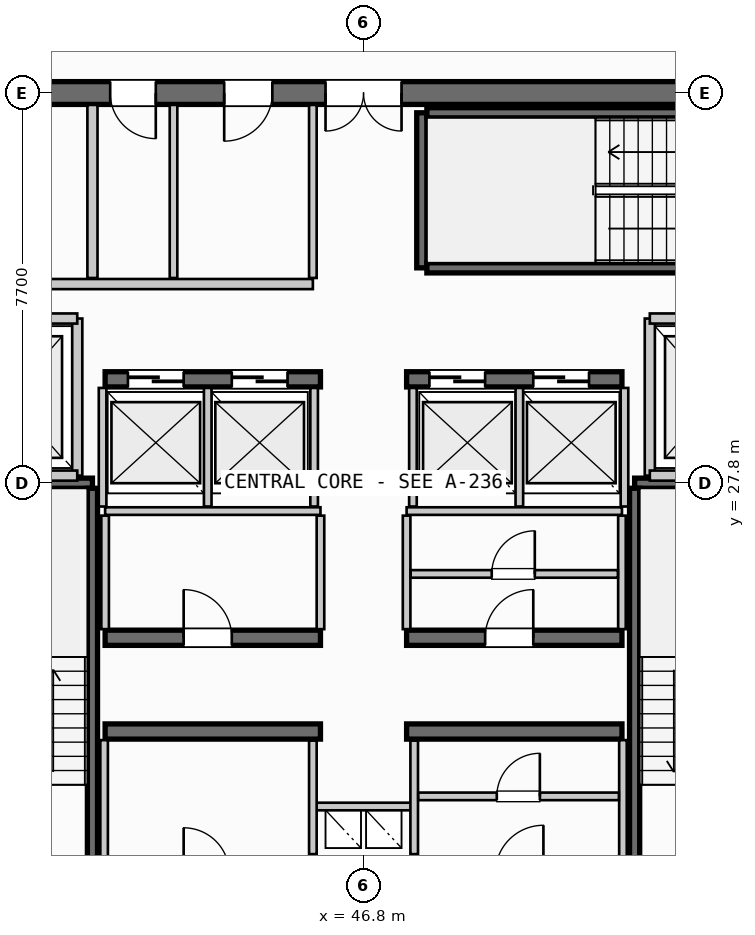
"""IFC4 building model, lengths in metres.
Left out: names, types, materials, properties, quantities, classifications, styles, units other than length and angle.
Written with IfcOpenShell. Run it as: python <this file> out.ifc"""

import sys

from ifc_helpers import new_model, si_unit, direction, frame, frame_2d, origin, place, context, subcontext, project, spatial, rectangle, extrude, source, transform, mapped, element, fill, save


model = new_model("IFC4")
c1 = context("Model", 3, precision=1e-05, world=origin(), true_north=direction((0.0, 1.0)))
c2 = subcontext(c1, "Body", "Model", "MODEL_VIEW")
j1 = project(units=[si_unit("LENGTHUNIT", "METRE"), si_unit("PLANEANGLEUNIT", "RADIAN")], contexts=[c1])
p1 = place(None, origin())
s1 = spatial("IfcSite", under=j1, at=p1, CompositionType="ELEMENT")
p2 = place(p1, origin())
s2 = spatial("IfcBuilding", under=s1, at=p2, CompositionType="ELEMENT")
p3 = place(p2, frame((0.0, 0.0, 262.9)))
s3 = spatial("IfcBuildingStorey", under=s2, at=p3, CompositionType="ELEMENT", Elevation=262.9)
p4 = place(p3, frame((55.6, 35.5, 0.0), z_axis=(0.0, 0.0, 1.0), x_axis=(-1.0, 0.0, 0.0)))
e1 = element("IfcWall", 1, at=p4, inside=s3, PredefinedType="SHEAR", context=c2, shape_type="SweptSolid", body=[
    extrude(rectangle(XDim=17.6, YDim=0.45, at=frame_2d((8.8, 0.0))), origin(), (0.0, 0.0, 1.0), 3.21),
])
p5 = place(p4, frame((8.05, 0.0, 0.0)))
e2 = element("IfcOpeningElement", 2, at=p5, cuts=e1, PredefinedType="OPENING", context=c2, shape_type="SweptSolid", body=[
    extrude(rectangle(XDim=1.5, YDim=2.2, at=frame_2d((0.75, 1.1))), frame((0.0, 0.235, 0.0), z_axis=(0.0, -1.0, 0.0), x_axis=(1.0, 0.0, 0.0)), (0.0, 0.0, 1.0), 0.47),
])
p6 = place(p4, frame((15.1, 0.0, 0.0)))
e3 = element("IfcOpeningElement", 3, at=p6, cuts=e1, PredefinedType="OPENING", context=c2, shape_type="SweptSolid", body=[
    extrude(rectangle(XDim=0.95, YDim=2.15, at=frame_2d((0.475, 1.075))), frame((0.0, 0.235, 0.0), z_axis=(0.0, -1.0, 0.0), x_axis=(1.0, 0.0, 0.0)), (0.0, 0.0, 1.0), 0.47),
])
p7 = place(p4, frame((12.9, 0.0, 0.0)))
e4 = element("IfcOpeningElement", 4, at=p7, cuts=e1, PredefinedType="OPENING", context=c2, shape_type="SweptSolid", body=[
    extrude(rectangle(XDim=0.9, YDim=2.15, at=frame_2d((0.45, 1.075))), frame((0.0, 0.235, 0.0), z_axis=(0.0, -1.0, 0.0), x_axis=(1.0, 0.0, 0.0)), (0.0, 0.0, 1.0), 0.47),
])
p8 = place(p4, frame((10.6, 0.0, 0.0)))
e5 = element("IfcOpeningElement", 5, at=p8, cuts=e1, PredefinedType="OPENING", context=c2, shape_type="SweptSolid", body=[
    extrude(rectangle(XDim=0.95, YDim=2.15, at=frame_2d((0.475, 1.075))), frame((0.0, 0.235, 0.0), z_axis=(0.0, -1.0, 0.0), x_axis=(1.0, 0.0, 0.0)), (0.0, 0.0, 1.0), 0.47),
])
for number, where, z_axis, x_axis in (
    (6, (41.7, 22.9, 0.0), (0.0, 0.0, 1.0), (1.0, 0.0, 0.0)),
    (7, (47.65, 22.9, 0.0), (0.0, 0.0, 1.0), (1.0, 0.0, 0.0)),
):
    element("IfcWall", number, at=place(p3, frame(where, z_axis=z_axis, x_axis=x_axis)), inside=s3, PredefinedType="SHEAR", context=c2, shape_type="SweptSolid", body=[
        extrude(rectangle(XDim=4.25, YDim=0.3, at=frame_2d((2.125, 0.0))), origin(), (0.0, 0.0, 1.0), 3.21),
    ])
p9 = place(p3, frame((41.7, 24.75, 0.0), z_axis=(0.0, 0.0, 1.0), x_axis=(1.0, 0.0, 0.0)))
e8 = element("IfcWall", 8, at=p9, inside=s3, PredefinedType="SHEAR", context=c2, shape_type="SweptSolid", body=[
    extrude(rectangle(XDim=4.25, YDim=0.3, at=frame_2d((2.125, 0.0))), origin(), (0.0, 0.0, 1.0), 3.21),
])
p10 = place(p9, frame((1.55, 0.0, 0.0)))
e9 = element("IfcOpeningElement", 9, at=p10, cuts=e8, PredefinedType="OPENING", context=c2, shape_type="SweptSolid", body=[
    extrude(rectangle(XDim=0.95, YDim=2.15, at=frame_2d((0.475, 1.075))), frame((0.0, 0.16, 0.0), z_axis=(0.0, -1.0, 0.0), x_axis=(1.0, 0.0, 0.0)), (0.0, 0.0, 1.0), 0.32),
])
p11 = place(p3, frame((47.65, 24.75, 0.0), z_axis=(0.0, 0.0, 1.0), x_axis=(1.0, 0.0, 0.0)))
e10 = element("IfcWall", 10, at=p11, inside=s3, PredefinedType="SHEAR", context=c2, shape_type="SweptSolid", body=[
    extrude(rectangle(XDim=4.25, YDim=0.3, at=frame_2d((2.125, 0.0))), origin(), (0.0, 0.0, 1.0), 3.21),
])
p12 = place(p11, frame((1.55, 0.0, 0.0)))
e11 = element("IfcOpeningElement", 11, at=p12, cuts=e10, PredefinedType="OPENING", context=c2, shape_type="SweptSolid", body=[
    extrude(rectangle(XDim=0.95, YDim=2.15, at=frame_2d((0.475, 1.075))), frame((0.0, 0.16, 0.0), z_axis=(0.0, -1.0, 0.0), x_axis=(1.0, 0.0, 0.0)), (0.0, 0.0, 1.0), 0.32),
])
p13 = place(p3, frame((41.7, 29.85, 0.0), z_axis=(0.0, 0.0, 1.0), x_axis=(1.0, 0.0, 0.0)))
e12 = element("IfcWall", 12, at=p13, inside=s3, PredefinedType="SHEAR", context=c2, shape_type="SweptSolid", body=[
    extrude(rectangle(XDim=4.25, YDim=0.3, at=frame_2d((2.125, 0.0))), origin(), (0.0, 0.0, 1.0), 3.21),
])
p14 = place(p13, frame((0.45, 0.0, 0.0)))
e13 = element("IfcOpeningElement", 13, at=p14, cuts=e12, PredefinedType="OPENING", context=c2, shape_type="SweptSolid", body=[
    extrude(rectangle(XDim=1.1, YDim=2.2, at=frame_2d((0.55, 1.1))), frame((0.0, 0.16, 0.0), z_axis=(0.0, -1.0, 0.0), x_axis=(1.0, 0.0, 0.0)), (0.0, 0.0, 1.0), 0.32),
])
p15 = place(p13, frame((2.5, 0.0, 0.0)))
e14 = element("IfcOpeningElement", 14, at=p15, cuts=e12, PredefinedType="OPENING", context=c2, shape_type="SweptSolid", body=[
    extrude(rectangle(XDim=1.1, YDim=2.2, at=frame_2d((0.55, 1.1))), frame((0.0, 0.16, 0.0), z_axis=(0.0, -1.0, 0.0), x_axis=(1.0, 0.0, 0.0)), (0.0, 0.0, 1.0), 0.32),
])
p16 = place(p3, frame((47.65, 29.85, 0.0), z_axis=(0.0, 0.0, 1.0), x_axis=(1.0, 0.0, 0.0)))
e15 = element("IfcWall", 15, at=p16, inside=s3, PredefinedType="SHEAR", context=c2, shape_type="SweptSolid", body=[
    extrude(rectangle(XDim=4.25, YDim=0.3, at=frame_2d((2.125, 0.0))), origin(), (0.0, 0.0, 1.0), 3.21),
])
p17 = place(p16, frame((0.45, 0.0, 0.0)))
e16 = element("IfcOpeningElement", 16, at=p17, cuts=e15, PredefinedType="OPENING", context=c2, shape_type="SweptSolid", body=[
    extrude(rectangle(XDim=1.1, YDim=2.2, at=frame_2d((0.55, 1.1))), frame((0.0, 0.16, 0.0), z_axis=(0.0, -1.0, 0.0), x_axis=(1.0, 0.0, 0.0)), (0.0, 0.0, 1.0), 0.32),
])
p18 = place(p16, frame((2.5, 0.0, 0.0)))
e17 = element("IfcOpeningElement", 17, at=p18, cuts=e15, PredefinedType="OPENING", context=c2, shape_type="SweptSolid", body=[
    extrude(rectangle(XDim=1.1, YDim=2.2, at=frame_2d((0.55, 1.1))), frame((0.0, 0.16, 0.0), z_axis=(0.0, -1.0, 0.0), x_axis=(1.0, 0.0, 0.0)), (0.0, 0.0, 1.0), 0.32),
])
p19 = place(p3, frame((38.39, 27.8, 0.0), z_axis=(0.0, 0.0, 1.0), x_axis=(1.0, 0.0, 0.0)))
e18 = element("IfcWall", 18, at=p19, inside=s3, PredefinedType="SHEAR", context=c2, shape_type="SweptSolid", body=[
    extrude(rectangle(XDim=3.06, YDim=0.2, at=frame_2d((1.53, 0.0))), origin(), (0.0, 0.0, 1.0), 3.21),
])
p20 = place(p3, frame((41.45, 27.7, 0.0), z_axis=(0.0, 0.0, 1.0), x_axis=(0.0, -1.0, 0.0)))
e19 = element("IfcWall", 19, at=p20, inside=s3, PredefinedType="SHEAR", context=c2, shape_type="SweptSolid", body=[
    extrude(rectangle(XDim=7.35, YDim=0.2, at=frame_2d((3.675, 0.0))), origin(), (0.0, 0.0, 1.0), 3.21),
])
p21 = place(p3, frame((52.15, 27.8, 0.0), z_axis=(0.0, 0.0, 1.0), x_axis=(1.0, 0.0, 0.0)))
e20 = element("IfcWall", 20, at=p21, inside=s3, PredefinedType="SHEAR", context=c2, shape_type="SweptSolid", body=[
    extrude(rectangle(XDim=3.06, YDim=0.2, at=frame_2d((1.53, 0.0))), origin(), (0.0, 0.0, 1.0), 3.21),
])
p22 = place(p3, frame((52.15, 20.35, 0.0), z_axis=(0.0, 0.0, 1.0), x_axis=(0.0, 1.0, 0.0)))
e21 = element("IfcWall", 21, at=p22, inside=s3, PredefinedType="SHEAR", context=c2, shape_type="SweptSolid", body=[
    extrude(rectangle(XDim=7.35, YDim=0.2, at=frame_2d((3.675, 0.0))), origin(), (0.0, 0.0, 1.0), 3.21),
])
p23 = place(p3, frame((47.95, 32.05, 0.0), z_axis=(0.0, 0.0, 1.0), x_axis=(0.0, 1.0, 0.0)))
e22 = element("IfcWall", 22, at=p23, inside=s3, PredefinedType="SHEAR", context=c2, shape_type="SweptSolid", body=[
    extrude(rectangle(XDim=3.06, YDim=0.2, at=frame_2d((1.53, 0.0))), origin(), (0.0, 0.0, 1.0), 3.21),
])
for number, where, z_axis, x_axis in (
    (23, (48.05, 35.11, 0.0), (0.0, 0.0, 1.0), (1.0, 0.0, 0.0)),
    (24, (55.4, 32.05, 0.0), (0.0, 0.0, 1.0), (-1.0, 0.0, 0.0)),
):
    element("IfcWall", number, at=place(p3, frame(where, z_axis=z_axis, x_axis=x_axis)), inside=s3, PredefinedType="SHEAR", context=c2, shape_type="SweptSolid", body=[
        extrude(rectangle(XDim=7.35, YDim=0.2, at=frame_2d((3.675, 0.0))), origin(), (0.0, 0.0, 1.0), 3.21),
    ])
p24 = place(p3, frame((45.8, 21.42, 0.0), z_axis=(0.0, 0.0, 1.0), x_axis=(1.0, 0.0, 0.0)))
e25 = element("IfcWall", 25, at=p24, inside=s3, PredefinedType="PARTITIONING", context=c2, shape_type="SweptSolid", body=[
    extrude(rectangle(XDim=2.0, YDim=0.15, at=frame_2d((1.0, 0.0))), origin(), (0.0, 0.0, 1.0), 2.735),
])
for number, where, z_axis, x_axis in (
    (26, (45.8, 20.48, 0.0), (0.0, 0.0, 1.0), (0.0, 1.0, 0.0)),
    (27, (47.8, 20.48, 0.0), (0.0, 0.0, 1.0), (0.0, 1.0, 0.0)),
):
    element("IfcWall", number, at=place(p3, frame(where, z_axis=z_axis, x_axis=x_axis)), inside=s3, PredefinedType="PARTITIONING", context=c2, shape_type="SweptSolid", body=[
        extrude(rectangle(XDim=2.24, YDim=0.15, at=frame_2d((1.12, 0.0))), origin(), (0.0, 0.0, 1.0), 2.735),
    ])
p25 = place(p3, frame((41.15, 27.95, 0.0), z_axis=(0.0, 0.0, 1.0), x_axis=(0.0, 1.0, 0.0)))
e28 = element("IfcWall", 28, at=p25, inside=s3, PredefinedType="PARTITIONING", context=c2, shape_type="SweptSolid", body=[
    extrude(rectangle(XDim=3.1, YDim=0.2, at=frame_2d((1.55, 0.0))), origin(), (0.0, 0.0, 1.0), 2.735),
])
for number, where, z_axis, x_axis in (
    (29, (38.235, 27.95, 0.0), (0.0, 0.0, 1.0), (1.0, 0.0, 0.0)),
    (30, (38.235, 31.05, 0.0), (0.0, 0.0, 1.0), (1.0, 0.0, 0.0)),
):
    element("IfcWall", number, at=place(p3, frame(where, z_axis=z_axis, x_axis=x_axis)), inside=s3, PredefinedType="PARTITIONING", context=c2, shape_type="SweptSolid", body=[
        extrude(rectangle(XDim=2.915, YDim=0.2, at=frame_2d((1.458, 0.0))), origin(), (0.0, 0.0, 1.0), 2.735),
    ])
p26 = place(p3, frame((52.45, 27.95, 0.0), z_axis=(0.0, 0.0, 1.0), x_axis=(0.0, 1.0, 0.0)))
e31 = element("IfcWall", 31, at=p26, inside=s3, PredefinedType="PARTITIONING", context=c2, shape_type="SweptSolid", body=[
    extrude(rectangle(XDim=3.1, YDim=0.2, at=frame_2d((1.55, 0.0))), origin(), (0.0, 0.0, 1.0), 2.735),
])
for number, where, z_axis, x_axis in (
    (32, (52.45, 27.95, 0.0), (0.0, 0.0, 1.0), (1.0, 0.0, 0.0)),
    (33, (52.45, 31.05, 0.0), (0.0, 0.0, 1.0), (1.0, 0.0, 0.0)),
):
    element("IfcWall", number, at=place(p3, frame(where, z_axis=z_axis, x_axis=x_axis)), inside=s3, PredefinedType="PARTITIONING", context=c2, shape_type="SweptSolid", body=[
        extrude(rectangle(XDim=2.915, YDim=0.2, at=frame_2d((1.458, 0.0))), origin(), (0.0, 0.0, 1.0), 2.735),
    ])
for number, where, z_axis, x_axis in (
    (34, (41.68, 20.335, 0.0), (0.0, 0.0, 1.0), (0.0, 1.0, 0.0)),
    (35, (51.92, 20.335, 0.0), (0.0, 0.0, 1.0), (0.0, 1.0, 0.0)),
):
    element("IfcWall", number, at=place(p3, frame(where, z_axis=z_axis, x_axis=x_axis)), inside=s3, PredefinedType="PARTITIONING", context=c2, shape_type="SweptSolid", body=[
        extrude(rectangle(XDim=2.395, YDim=0.15, at=frame_2d((1.198, 0.0))), origin(), (0.0, 0.0, 1.0), 2.735),
    ])
p27 = place(p3, frame((47.88, 21.62, 0.0), z_axis=(0.0, 0.0, 1.0), x_axis=(1.0, 0.0, 0.0)))
e36 = element("IfcWall", 36, at=p27, inside=s3, PredefinedType="PARTITIONING", context=c2, shape_type="SweptSolid", body=[
    extrude(rectangle(XDim=3.96, YDim=0.15, at=frame_2d((1.98, 0.0))), origin(), (0.0, 0.0, 1.0), 2.735),
])
p28 = place(p27, frame((1.55, 0.0, 0.0)))
e37 = element("IfcOpeningElement", 37, at=p28, cuts=e36, PredefinedType="OPENING", context=c2, shape_type="SweptSolid", body=[
    extrude(rectangle(XDim=0.85, YDim=2.15, at=frame_2d((0.425, 1.075))), frame((0.0, 0.085, 0.0), z_axis=(0.0, -1.0, 0.0), x_axis=(1.0, 0.0, 0.0)), (0.0, 0.0, 1.0), 0.17),
])
for number, where, z_axis, x_axis in (
    (38, (41.7, 27.25, 0.0), (0.0, 0.0, 1.0), (1.0, 0.0, 0.0)),
    (39, (47.65, 27.25, 0.0), (0.0, 0.0, 1.0), (1.0, 0.0, 0.0)),
):
    element("IfcWall", number, at=place(p3, frame(where, z_axis=z_axis, x_axis=x_axis)), inside=s3, PredefinedType="PARTITIONING", context=c2, shape_type="SweptSolid", body=[
        extrude(rectangle(XDim=4.25, YDim=0.15, at=frame_2d((2.125, 0.0))), origin(), (0.0, 0.0, 1.0), 2.735),
    ])
for number, where, z_axis, x_axis in (
    (40, (41.7, 24.92, 0.0), (0.0, 0.0, 1.0), (0.0, 1.0, 0.0)),
    (41, (45.95, 24.92, 0.0), (0.0, 0.0, 1.0), (0.0, 1.0, 0.0)),
    (42, (47.65, 24.92, 0.0), (0.0, 0.0, 1.0), (0.0, 1.0, 0.0)),
    (43, (51.9, 24.92, 0.0), (0.0, 0.0, 1.0), (0.0, 1.0, 0.0)),
):
    element("IfcWall", number, at=place(p3, frame(where, z_axis=z_axis, x_axis=x_axis)), inside=s3, PredefinedType="PARTITIONING", context=c2, shape_type="SweptSolid", body=[
        extrude(rectangle(XDim=2.24, YDim=0.15, at=frame_2d((1.12, 0.0))), origin(), (0.0, 0.0, 1.0), 2.735),
    ])
p29 = place(p3, frame((47.73, 26.01, 0.0), z_axis=(0.0, 0.0, 1.0), x_axis=(1.0, 0.0, 0.0)))
e44 = element("IfcWall", 44, at=p29, inside=s3, PredefinedType="PARTITIONING", context=c2, shape_type="SweptSolid", body=[
    extrude(rectangle(XDim=4.09, YDim=0.15, at=frame_2d((2.045, 0.0))), origin(), (0.0, 0.0, 1.0), 2.735),
])
p30 = place(p29, frame((1.6, 0.0, 0.0)))
e45 = element("IfcOpeningElement", 45, at=p30, cuts=e44, PredefinedType="OPENING", context=c2, shape_type="SweptSolid", body=[
    extrude(rectangle(XDim=0.85, YDim=2.15, at=frame_2d((0.425, 1.075))), frame((0.0, 0.085, 0.0), z_axis=(0.0, -1.0, 0.0), x_axis=(1.0, 0.0, 0.0)), (0.0, 0.0, 1.0), 0.17),
])
for number, where, z_axis, x_axis in (
    (46, (41.65, 27.34, 0.0), (0.0, 0.0, 1.0), (0.0, 1.0, 0.0)),
    (47, (43.725, 27.34, 0.0), (0.0, 0.0, 1.0), (0.0, 1.0, 0.0)),
    (48, (45.825, 27.34, 0.0), (0.0, 0.0, 1.0), (0.0, 1.0, 0.0)),
    (49, (47.775, 27.34, 0.0), (0.0, 0.0, 1.0), (0.0, 1.0, 0.0)),
    (50, (49.875, 27.34, 0.0), (0.0, 0.0, 1.0), (0.0, 1.0, 0.0)),
    (51, (51.95, 27.34, 0.0), (0.0, 0.0, 1.0), (0.0, 1.0, 0.0)),
):
    element("IfcWall", number, at=place(p3, frame(where, z_axis=z_axis, x_axis=x_axis)), inside=s3, PredefinedType="PARTITIONING", context=c2, shape_type="SweptSolid", body=[
        extrude(rectangle(XDim=2.34, YDim=0.15, at=frame_2d((1.17, 0.0))), origin(), (0.0, 0.0, 1.0), 2.735),
    ])
p31 = place(p3, frame((41.45, 31.85, 0.0), z_axis=(0.0, 0.0, 1.0), x_axis=(0.0, 1.0, 0.0)))
e52 = element("IfcWall", 52, at=p31, inside=s3, PredefinedType="PARTITIONING", context=c2, shape_type="SweptSolid", body=[
    extrude(rectangle(XDim=3.415, YDim=0.2, at=frame_2d((1.708, 0.0))), origin(), (0.0, 0.0, 1.0), 2.735),
])
p32 = place(p3, frame((38.235, 31.73, 0.0), z_axis=(0.0, 0.0, 1.0), x_axis=(1.0, 0.0, 0.0)))
e53 = element("IfcWall", 53, at=p32, inside=s3, PredefinedType="PARTITIONING", context=c2, shape_type="SweptSolid", body=[
    extrude(rectangle(XDim=7.565, YDim=0.2, at=frame_2d((3.782, 0.0))), origin(), (0.0, 0.0, 1.0), 2.735),
])
p33 = place(p3, frame((45.8, 31.85, 0.0), z_axis=(0.0, 0.0, 1.0), x_axis=(0.0, 1.0, 0.0)))
e54 = element("IfcWall", 54, at=p33, inside=s3, PredefinedType="PARTITIONING", context=c2, shape_type="SweptSolid", body=[
    extrude(rectangle(XDim=3.415, YDim=0.15, at=frame_2d((1.708, 0.0))), origin(), (0.0, 0.0, 1.0), 2.735),
])
p34 = place(p3, frame((43.05, 31.85, 0.0), z_axis=(0.0, 0.0, 1.0), x_axis=(0.0, 1.0, 0.0)))
e55 = element("IfcWall", 55, at=p34, inside=s3, PredefinedType="PLUMBINGWALL", context=c2, shape_type="SweptSolid", body=[
    extrude(rectangle(XDim=3.415, YDim=0.15, at=frame_2d((1.708, 0.0))), origin(), (0.0, 0.0, 1.0), 2.735),
])
m1 = source(origin(), c2, "Body", "SweptSolid", [
    extrude(rectangle(XDim=1.5, YDim=2.2, at=frame_2d((0.75, 1.1))), frame((0.0, 0.025, 0.0), z_axis=(0.0, -1.0, 0.0), x_axis=(1.0, 0.0, 0.0)), (0.0, 0.0, 1.0), 0.05),
])
p35 = place(p5, origin())
e56 = element("IfcDoor", 56, at=p35, inside=s3, OperationType="DOUBLE_DOOR_SINGLE_SWING", PredefinedType="DOOR", context=c2, shape_type="MappedRepresentation", body=[
    mapped(m1, transform((0.0, 0.0, 0.0), scale=1.0)),
])
fill(e2, e56)
m2 = source(origin(), c2, "Body", "SweptSolid", [
    extrude(rectangle(XDim=0.95, YDim=2.15, at=frame_2d((0.475, 1.075))), frame((0.0, 0.025, 0.0), z_axis=(0.0, -1.0, 0.0), x_axis=(1.0, 0.0, 0.0)), (0.0, 0.0, 1.0), 0.05),
])
p36 = place(p10, origin())
e57 = element("IfcDoor", 57, at=p36, inside=s3, OperationType="SINGLE_SWING_LEFT", PredefinedType="DOOR", context=c2, shape_type="MappedRepresentation", body=[
    mapped(m2, transform((0.0, 0.0, 0.0), scale=1.0)),
])
fill(e9, e57)
p37 = place(p12, origin())
e58 = element("IfcDoor", 58, at=p37, inside=s3, OperationType="SINGLE_SWING_RIGHT", PredefinedType="DOOR", context=c2, shape_type="MappedRepresentation", body=[
    mapped(m2, transform((0.0, 0.0, 0.0), scale=1.0)),
])
fill(e11, e58)
m3 = source(origin(), c2, "Body", "SweptSolid", [
    extrude(rectangle(XDim=1.1, YDim=2.2, at=frame_2d((0.55, 1.1))), frame((0.0, 0.025, 0.0), z_axis=(0.0, -1.0, 0.0), x_axis=(1.0, 0.0, 0.0)), (0.0, 0.0, 1.0), 0.05),
])
p38 = place(p14, origin())
e59 = element("IfcDoor", 59, at=p38, inside=s3, OperationType="SLIDING_TO_LEFT", PredefinedType="DOOR", context=c2, shape_type="MappedRepresentation", body=[
    mapped(m3, transform((0.0, 0.0, 0.0), scale=1.0)),
])
fill(e13, e59)
p39 = place(p15, origin())
e60 = element("IfcDoor", 60, at=p39, inside=s3, OperationType="SLIDING_TO_LEFT", PredefinedType="DOOR", context=c2, shape_type="MappedRepresentation", body=[
    mapped(m3, transform((0.0, 0.0, 0.0), scale=1.0)),
])
fill(e14, e60)
p40 = place(p17, origin())
e61 = element("IfcDoor", 61, at=p40, inside=s3, OperationType="SLIDING_TO_LEFT", PredefinedType="DOOR", context=c2, shape_type="MappedRepresentation", body=[
    mapped(m3, transform((0.0, 0.0, 0.0), scale=1.0)),
])
fill(e16, e61)
p41 = place(p18, origin())
e62 = element("IfcDoor", 62, at=p41, inside=s3, OperationType="SLIDING_TO_LEFT", PredefinedType="DOOR", context=c2, shape_type="MappedRepresentation", body=[
    mapped(m3, transform((0.0, 0.0, 0.0), scale=1.0)),
])
fill(e17, e62)
m4 = source(origin(), c2, "Body", "SweptSolid", [
    extrude(rectangle(XDim=0.9, YDim=2.15, at=frame_2d((0.45, 1.075))), frame((0.0, 0.025, 0.0), z_axis=(0.0, -1.0, 0.0), x_axis=(1.0, 0.0, 0.0)), (0.0, 0.0, 1.0), 0.05),
])
p42 = place(p7, origin())
e63 = element("IfcDoor", 63, at=p42, inside=s3, OperationType="SINGLE_SWING_LEFT", PredefinedType="DOOR", context=c2, shape_type="MappedRepresentation", body=[
    mapped(m4, transform((0.0, 0.0, 0.0), scale=1.0)),
])
fill(e4, e63)
p43 = place(p8, origin())
e64 = element("IfcDoor", 64, at=p43, inside=s3, OperationType="SINGLE_SWING_RIGHT", PredefinedType="DOOR", context=c2, shape_type="MappedRepresentation", body=[
    mapped(m2, transform((0.0, 0.0, 0.0), scale=1.0)),
])
fill(e5, e64)
m5 = source(origin(), c2, "Body", "SweptSolid", [
    extrude(rectangle(XDim=0.85, YDim=2.15, at=frame_2d((0.425, 1.075))), frame((0.0, 0.025, 0.0), z_axis=(0.0, -1.0, 0.0), x_axis=(1.0, 0.0, 0.0)), (0.0, 0.0, 1.0), 0.05),
])
p44 = place(p28, origin())
e65 = element("IfcDoor", 65, at=p44, inside=s3, OperationType="SINGLE_SWING_RIGHT", PredefinedType="DOOR", context=c2, shape_type="MappedRepresentation", body=[
    mapped(m5, transform((0.0, 0.0, 0.0), scale=1.0)),
])
fill(e37, e65)
p45 = place(p30, origin())
e66 = element("IfcDoor", 66, at=p45, inside=s3, OperationType="SINGLE_SWING_RIGHT", PredefinedType="DOOR", context=c2, shape_type="MappedRepresentation", body=[
    mapped(m5, transform((0.0, 0.0, 0.0), scale=1.0)),
])
fill(e45, e66)
save(model, sys.argv[1])
